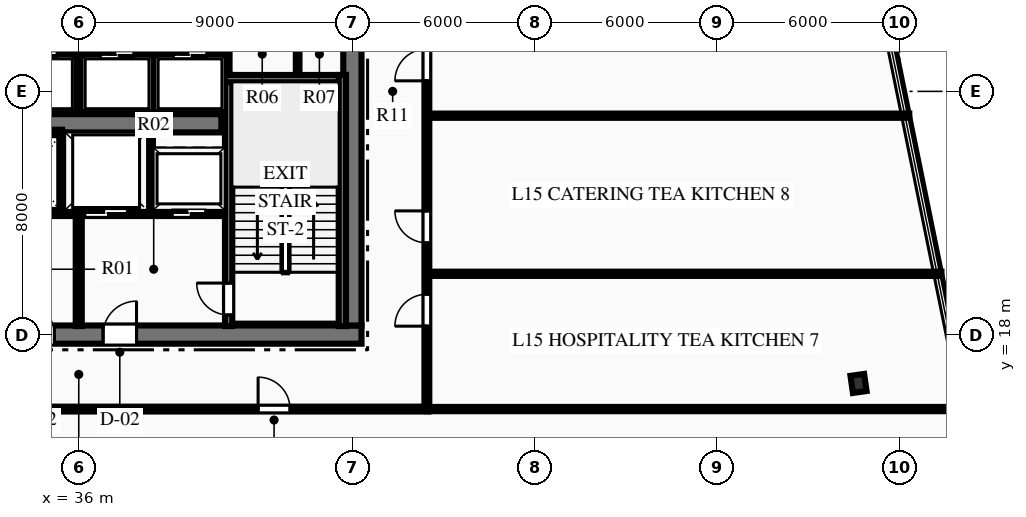
"""IFC4 building model, lengths in metres.
Left out: names, types, materials, properties, quantities, classifications, styles, units other than length and angle.
Written with IfcOpenShell. Run it as: python <this file> out.ifc"""

import sys

from ifc_helpers import new_model, si_unit, direction, frame, frame_2d, origin, origin_2d, place, context, subcontext, project, spatial, rectangle, i_section, extrude, element, fill, save


model = new_model("IFC4")
c1 = context("Model", 3, precision=1e-05, world=origin(), true_north=direction((0.0, 1.0)))
c2 = subcontext(c1, "Body", "Model", "MODEL_VIEW")
j1 = project(units=[si_unit("LENGTHUNIT", "METRE"), si_unit("PLANEANGLEUNIT", "RADIAN")], contexts=[c1])
p1 = place(None, origin())
s1 = spatial("IfcSite", under=j1, at=p1, CompositionType="ELEMENT")
p2 = place(p1, origin())
s2 = spatial("IfcBuilding", under=s1, at=p2, CompositionType="ELEMENT")
p3 = place(p2, frame((0.0, 0.0, 66.45)))
s3 = spatial("IfcBuildingStorey", under=s2, at=p3, CompositionType="ELEMENT", Elevation=66.45)
p4 = place(p3, frame((26.7, 18.0, 0.0), z_axis=(0.0, 0.0, 1.0), x_axis=(1.0, 0.0, 0.0)))
e1 = element("IfcWall", 1, at=p4, inside=s3, PredefinedType="SHEAR", context=c2, shape_type="SweptSolid", body=[
    extrude(rectangle(XDim=18.6, YDim=0.6, at=frame_2d((9.3, 0.0))), origin(), (0.0, 0.0, 1.0), 3.75),
])
p5 = place(p4, frame((7.4, 0.0, 0.0)))
e2 = element("IfcOpeningElement", 2, at=p5, cuts=e1, PredefinedType="OPENING", context=c2, shape_type="SweptSolid", body=[
    extrude(rectangle(XDim=1.1, YDim=2.15, at=frame_2d((0.55, 1.075))), frame((0.0, 0.31, 0.0), z_axis=(0.0, -1.0, 0.0), x_axis=(1.0, 0.0, 0.0)), (0.0, 0.0, 1.0), 0.62),
])
p6 = place(p4, frame((10.1, 0.0, 0.0)))
e3 = element("IfcOpeningElement", 3, at=p6, cuts=e1, PredefinedType="OPENING", context=c2, shape_type="SweptSolid", body=[
    extrude(rectangle(XDim=1.1, YDim=2.15, at=frame_2d((0.55, 1.075))), frame((0.0, 0.31, 0.0), z_axis=(0.0, -1.0, 0.0), x_axis=(1.0, 0.0, 0.0)), (0.0, 0.0, 1.0), 0.62),
])
p7 = place(p3, frame((45.0, 18.3, 0.0), z_axis=(0.0, 0.0, 1.0), x_axis=(0.0, 1.0, 0.0)))
e4 = element("IfcWall", 4, at=p7, inside=s3, PredefinedType="SHEAR", context=c2, shape_type="SweptSolid", body=[
    extrude(rectangle(XDim=15.4, YDim=0.6, at=frame_2d((7.7, 0.0))), origin(), (0.0, 0.0, 1.0), 3.75),
])
p8 = place(p7, frame((9.94, 0.0, 0.0)))
e5 = element("IfcOpeningElement", 5, at=p8, cuts=e4, PredefinedType="OPENING", context=c2, shape_type="SweptSolid", body=[
    extrude(rectangle(XDim=1.4, YDim=2.2, at=frame_2d((0.7, 1.1))), frame((0.0, 0.31, 0.0), z_axis=(0.0, -1.0, 0.0), x_axis=(1.0, 0.0, 0.0)), (0.0, 0.0, 1.0), 0.62),
])
p9 = place(p3, frame((31.31, 24.95, 0.0), z_axis=(0.0, 0.0, 1.0), x_axis=(1.0, 0.0, 0.0)))
e6 = element("IfcWall", 6, at=p9, inside=s3, PredefinedType="SHEAR", context=c2, shape_type="SweptSolid", body=[
    extrude(rectangle(XDim=9.38, YDim=0.6, at=frame_2d((4.69, 0.0))), origin(), (0.0, 0.0, 1.0), 3.75),
])
p10 = place(p3, frame((40.93, 18.28, 0.0), z_axis=(0.0, 0.0, 1.0), x_axis=(0.0, 1.0, 0.0)))
e7 = element("IfcWall", 7, at=p10, inside=s3, PredefinedType="SHEAR", context=c2, shape_type="SweptSolid", body=[
    extrude(rectangle(XDim=8.26, YDim=0.24, at=frame_2d((4.13, 0.0))), origin(), (0.0, 0.0, 1.0), 3.75),
])
p11 = place(p10, frame((0.365, 0.0, 0.0)))
e8 = element("IfcOpeningElement", 8, at=p11, cuts=e7, PredefinedType="OPENING", context=c2, shape_type="SweptSolid", body=[
    extrude(rectangle(XDim=1.05, YDim=2.15, at=frame_2d((0.525, 1.075))), frame((0.0, 0.13, 0.0), z_axis=(0.0, -1.0, 0.0), x_axis=(1.0, 0.0, 0.0)), (0.0, 0.0, 1.0), 0.26),
])
p12 = place(p3, frame((40.81, 26.42, 0.0), z_axis=(0.0, 0.0, 1.0), x_axis=(1.0, 0.0, 0.0)))
e9 = element("IfcWall", 9, at=p12, inside=s3, PredefinedType="SHEAR", context=c2, shape_type="SweptSolid", body=[
    extrude(rectangle(XDim=3.98, YDim=0.24, at=frame_2d((1.99, 0.0))), origin(), (0.0, 0.0, 1.0), 3.75),
])
p13 = place(p3, frame((44.67, 18.28, 0.0), z_axis=(0.0, 0.0, 1.0), x_axis=(0.0, 1.0, 0.0)))
e10 = element("IfcWall", 10, at=p13, inside=s3, PredefinedType="SHEAR", context=c2, shape_type="SweptSolid", body=[
    extrude(rectangle(XDim=8.26, YDim=0.24, at=frame_2d((4.13, 0.0))), origin(), (0.0, 0.0, 1.0), 3.75),
])
p14 = place(p3, frame((61.648, 16.393, 0.0), z_axis=(0.0, 0.0, 1.0), x_axis=(0.990146240249, 0.140037219771, 0.0)))
e11 = element("IfcColumn", 11, at=p14, inside=s3, PredefinedType="COLUMN", context=c2, shape_type="SweptSolid", body=[
    extrude(i_section(OverallWidth=0.454, OverallDepth=0.569, WebThickness=0.078, FlangeThickness=0.125, at=origin_2d()), origin(), (0.0, 0.0, 1.0), 3.75),
])
p15 = place(p3, frame((36.0, 18.28, 0.0), z_axis=(0.0, 0.0, 1.0), x_axis=(0.0, 1.0, 0.0)))
e12 = element("IfcWall", 12, at=p15, inside=s3, PredefinedType="PARTITIONING", context=c2, shape_type="SweptSolid", body=[
    extrude(rectangle(XDim=3.77, YDim=0.2, at=frame_2d((1.885, 0.0))), origin(), (0.0, 0.0, 1.0), 3.44),
])
p16 = place(p3, frame((31.19, 22.0, 0.0), z_axis=(0.0, 0.0, 1.0), x_axis=(1.0, 0.0, 0.0)))
e13 = element("IfcWall", 13, at=p16, inside=s3, PredefinedType="PARTITIONING", context=c2, shape_type="SweptSolid", body=[
    extrude(rectangle(XDim=4.69, YDim=0.2, at=frame_2d((2.345, 0.0))), origin(), (0.0, 0.0, 1.0), 3.44),
])
p17 = place(p16, frame((2.91, 0.0, 0.0)))
e14 = element("IfcOpeningElement", 14, at=p17, cuts=e13, PredefinedType="OPENING", context=c2, shape_type="SweptSolid", body=[
    extrude(rectangle(XDim=0.9, YDim=2.15, at=frame_2d((0.45, 1.075))), frame((0.0, 0.11, 0.0), z_axis=(0.0, -1.0, 0.0), x_axis=(1.0, 0.0, 0.0)), (0.0, 0.0, 1.0), 0.22),
])
p18 = place(p16, frame((0.635, 0.0, 0.0)))
e15 = element("IfcOpeningElement", 15, at=p18, cuts=e13, PredefinedType="OPENING", context=c2, shape_type="SweptSolid", body=[
    extrude(rectangle(XDim=1.1, YDim=2.15, at=frame_2d((0.55, 1.075))), frame((0.0, 0.11, 0.0), z_axis=(0.0, -1.0, 0.0), x_axis=(1.0, 0.0, 0.0)), (0.0, 0.0, 1.0), 0.22),
])
p19 = place(p3, frame((36.12, 22.0, 0.0), z_axis=(0.0, 0.0, 1.0), x_axis=(1.0, 0.0, 0.0)))
e16 = element("IfcWall", 16, at=p19, inside=s3, PredefinedType="PARTITIONING", context=c2, shape_type="SweptSolid", body=[
    extrude(rectangle(XDim=4.69, YDim=0.2, at=frame_2d((2.345, 0.0))), origin(), (0.0, 0.0, 1.0), 3.44),
])
p20 = place(p19, frame((2.955, 0.0, 0.0)))
e17 = element("IfcOpeningElement", 17, at=p20, cuts=e16, PredefinedType="OPENING", context=c2, shape_type="SweptSolid", body=[
    extrude(rectangle(XDim=1.1, YDim=2.15, at=frame_2d((0.55, 1.075))), frame((0.0, 0.11, 0.0), z_axis=(0.0, -1.0, 0.0), x_axis=(1.0, 0.0, 0.0)), (0.0, 0.0, 1.0), 0.22),
])
p21 = place(p19, frame((0.08, 0.0, 0.0)))
e18 = element("IfcOpeningElement", 18, at=p21, cuts=e16, PredefinedType="OPENING", context=c2, shape_type="SweptSolid", body=[
    extrude(rectangle(XDim=1.4, YDim=2.2, at=frame_2d((0.7, 1.1))), frame((0.0, 0.11, 0.0), z_axis=(0.0, -1.0, 0.0), x_axis=(1.0, 0.0, 0.0)), (0.0, 0.0, 1.0), 0.22),
])
p22 = place(p3, frame((35.45, 22.05, 0.0), z_axis=(0.0, 0.0, 1.0), x_axis=(0.0, 1.0, 0.0)))
e19 = element("IfcWall", 19, at=p22, inside=s3, PredefinedType="PARTITIONING", context=c2, shape_type="SweptSolid", body=[
    extrude(rectangle(XDim=2.6, YDim=0.18, at=frame_2d((1.3, 0.0))), origin(), (0.0, 0.0, 1.0), 3.44),
])
p23 = place(p3, frame((33.65, 24.65, 0.0), z_axis=(0.0, 0.0, 1.0), x_axis=(1.0, 0.0, 0.0)))
e20 = element("IfcWall", 20, at=p23, inside=s3, PredefinedType="PARTITIONING", context=c2, shape_type="SweptSolid", body=[
    extrude(rectangle(XDim=1.8, YDim=0.18, at=frame_2d((0.9, 0.0))), origin(), (0.0, 0.0, 1.0), 3.44),
])
p24 = place(p3, frame((38.35, 22.05, 0.0), z_axis=(0.0, 0.0, 1.0), x_axis=(0.0, 1.0, 0.0)))
e21 = element("IfcWall", 21, at=p24, inside=s3, PredefinedType="PARTITIONING", context=c2, shape_type="SweptSolid", body=[
    extrude(rectangle(XDim=2.6, YDim=0.18, at=frame_2d((1.3, 0.0))), origin(), (0.0, 0.0, 1.0), 3.44),
])
p25 = place(p3, frame((40.88, 26.54, 0.0), z_axis=(0.0, 0.0, 1.0), x_axis=(0.0, 1.0, 0.0)))
e22 = element("IfcWall", 22, at=p25, inside=s3, PredefinedType="PARTITIONING", context=c2, shape_type="SweptSolid", body=[
    extrude(rectangle(XDim=1.51, YDim=0.16, at=frame_2d((0.755, 0.0))), origin(), (0.0, 0.0, 1.0), 3.44),
])
p26 = place(p3, frame((43.2, 26.54, 0.0), z_axis=(0.0, 0.0, 1.0), x_axis=(0.0, 1.0, 0.0)))
e23 = element("IfcWall", 23, at=p26, inside=s3, PredefinedType="PARTITIONING", context=c2, shape_type="SweptSolid", body=[
    extrude(rectangle(XDim=1.44, YDim=0.12, at=frame_2d((0.72, 0.0))), origin(), (0.0, 0.0, 1.0), 3.44),
])
p27 = place(p3, frame((31.2, 27.2, 0.0), z_axis=(0.0, 0.0, 1.0), x_axis=(1.0, 0.0, 0.0)))
e24 = element("IfcWall", 24, at=p27, inside=s3, PredefinedType="PARTITIONING", context=c2, shape_type="SweptSolid", body=[
    extrude(rectangle(XDim=9.6, YDim=0.18, at=frame_2d((4.8, 0.0))), origin(), (0.0, 0.0, 1.0), 3.44),
])
p28 = place(p27, frame((0.59, 0.0, 0.0)))
e25 = element("IfcOpeningElement", 25, at=p28, cuts=e24, PredefinedType="OPENING", context=c2, shape_type="SweptSolid", body=[
    extrude(rectangle(XDim=1.1, YDim=2.15, at=frame_2d((0.55, 1.075))), frame((0.0, 0.1, 0.0), z_axis=(0.0, -1.0, 0.0), x_axis=(1.0, 0.0, 0.0)), (0.0, 0.0, 1.0), 0.2),
])
p29 = place(p27, frame((2.99, 0.0, 0.0)))
e26 = element("IfcOpeningElement", 26, at=p29, cuts=e24, PredefinedType="OPENING", context=c2, shape_type="SweptSolid", body=[
    extrude(rectangle(XDim=1.1, YDim=2.15, at=frame_2d((0.55, 1.075))), frame((0.0, 0.1, 0.0), z_axis=(0.0, -1.0, 0.0), x_axis=(1.0, 0.0, 0.0)), (0.0, 0.0, 1.0), 0.2),
])
p30 = place(p27, frame((5.51, 0.0, 0.0)))
e27 = element("IfcOpeningElement", 27, at=p30, cuts=e24, PredefinedType="OPENING", context=c2, shape_type="SweptSolid", body=[
    extrude(rectangle(XDim=1.1, YDim=2.15, at=frame_2d((0.55, 1.075))), frame((0.0, 0.1, 0.0), z_axis=(0.0, -1.0, 0.0), x_axis=(1.0, 0.0, 0.0)), (0.0, 0.0, 1.0), 0.2),
])
p31 = place(p27, frame((7.91, 0.0, 0.0)))
e28 = element("IfcOpeningElement", 28, at=p31, cuts=e24, PredefinedType="OPENING", context=c2, shape_type="SweptSolid", body=[
    extrude(rectangle(XDim=1.1, YDim=2.15, at=frame_2d((0.55, 1.075))), frame((0.0, 0.1, 0.0), z_axis=(0.0, -1.0, 0.0), x_axis=(1.0, 0.0, 0.0)), (0.0, 0.0, 1.0), 0.2),
])
for number, where, z_axis, x_axis in (
    (29, (36.0, 25.3, 0.0), (0.0, 0.0, 1.0), (0.0, 1.0, 0.0)),
    (30, (38.46, 25.3, 0.0), (0.0, 0.0, 1.0), (0.0, 1.0, 0.0)),
):
    element("IfcWall", number, at=place(p3, frame(where, z_axis=z_axis, x_axis=x_axis)), inside=s3, PredefinedType="PARTITIONING", context=c2, shape_type="SweptSolid", body=[
        extrude(rectangle(XDim=1.9, YDim=0.18, at=frame_2d((0.95, 0.0))), origin(), (0.0, 0.0, 1.0), 3.44),
    ])
p32 = place(p3, frame((24.5, 15.55, 0.0), z_axis=(0.0, 0.0, 1.0), x_axis=(1.0, 0.0, 0.0)))
e31 = element("IfcWall", 31, at=p32, inside=s3, PredefinedType="PARTITIONING", context=c2, shape_type="SweptSolid", body=[
    extrude(rectangle(XDim=23.0, YDim=0.16, at=frame_2d((11.5, 0.0))), origin(), (0.0, 0.0, 1.0), 3.44),
])
p33 = place(p32, frame((1.25, 0.0, 0.0)))
e32 = element("IfcOpeningElement", 32, at=p33, cuts=e31, PredefinedType="OPENING", context=c2, shape_type="SweptSolid", body=[
    extrude(rectangle(XDim=0.9, YDim=2.15, at=frame_2d((0.45, 1.075))), frame((0.0, 0.09, 0.0), z_axis=(0.0, -1.0, 0.0), x_axis=(1.0, 0.0, 0.0)), (0.0, 0.0, 1.0), 0.18),
])
p34 = place(p32, frame((3.55, 0.0, 0.0)))
e33 = element("IfcOpeningElement", 33, at=p34, cuts=e31, PredefinedType="OPENING", context=c2, shape_type="SweptSolid", body=[
    extrude(rectangle(XDim=0.9, YDim=2.15, at=frame_2d((0.45, 1.075))), frame((0.0, 0.09, 0.0), z_axis=(0.0, -1.0, 0.0), x_axis=(1.0, 0.0, 0.0)), (0.0, 0.0, 1.0), 0.18),
])
p35 = place(p32, frame((5.8, 0.0, 0.0)))
e34 = element("IfcOpeningElement", 34, at=p35, cuts=e31, PredefinedType="OPENING", context=c2, shape_type="SweptSolid", body=[
    extrude(rectangle(XDim=1.0, YDim=2.15, at=frame_2d((0.5, 1.075))), frame((0.0, 0.09, 0.0), z_axis=(0.0, -1.0, 0.0), x_axis=(1.0, 0.0, 0.0)), (0.0, 0.0, 1.0), 0.18),
])
p36 = place(p32, frame((17.399, 0.0, 0.0)))
e35 = element("IfcOpeningElement", 35, at=p36, cuts=e31, PredefinedType="OPENING", context=c2, shape_type="SweptSolid", body=[
    extrude(rectangle(XDim=1.05, YDim=2.15, at=frame_2d((0.525, 1.075))), frame((0.0, 0.09, 0.0), z_axis=(0.0, -1.0, 0.0), x_axis=(1.0, 0.0, 0.0)), (0.0, 0.0, 1.0), 0.18),
])
p37 = place(p3, frame((47.45, 15.55, 0.0), z_axis=(0.0, 0.0, 1.0), x_axis=(0.0, 1.0, 0.0)))
e36 = element("IfcWall", 36, at=p37, inside=s3, PredefinedType="PARTITIONING", context=c2, shape_type="SweptSolid", body=[
    extrude(rectangle(XDim=20.9, YDim=0.16, at=frame_2d((10.45, 0.0))), origin(), (0.0, 0.0, 1.0), 3.44),
])
p38 = place(p37, frame((2.727, 0.0, 0.0)))
e37 = element("IfcOpeningElement", 37, at=p38, cuts=e36, PredefinedType="OPENING", context=c2, shape_type="SweptSolid", body=[
    extrude(rectangle(XDim=1.05, YDim=2.15, at=frame_2d((0.525, 1.075))), frame((0.0, 0.09, 0.0), z_axis=(0.0, -1.0, 0.0), x_axis=(1.0, 0.0, 0.0)), (0.0, 0.0, 1.0), 0.18),
])
p39 = place(p37, frame((5.469, 0.0, 0.0)))
e38 = element("IfcOpeningElement", 38, at=p39, cuts=e36, PredefinedType="OPENING", context=c2, shape_type="SweptSolid", body=[
    extrude(rectangle(XDim=1.05, YDim=2.15, at=frame_2d((0.525, 1.075))), frame((0.0, 0.09, 0.0), z_axis=(0.0, -1.0, 0.0), x_axis=(1.0, 0.0, 0.0)), (0.0, 0.0, 1.0), 0.18),
])
p40 = place(p37, frame((10.797, 0.0, 0.0)))
e39 = element("IfcOpeningElement", 39, at=p40, cuts=e36, PredefinedType="OPENING", context=c2, shape_type="SweptSolid", body=[
    extrude(rectangle(XDim=1.05, YDim=2.15, at=frame_2d((0.525, 1.075))), frame((0.0, 0.09, 0.0), z_axis=(0.0, -1.0, 0.0), x_axis=(1.0, 0.0, 0.0)), (0.0, 0.0, 1.0), 0.18),
])
p41 = place(p37, frame((18.461, 0.0, 0.0)))
e40 = element("IfcOpeningElement", 40, at=p41, cuts=e36, PredefinedType="OPENING", context=c2, shape_type="SweptSolid", body=[
    extrude(rectangle(XDim=1.05, YDim=2.15, at=frame_2d((0.525, 1.075))), frame((0.0, 0.09, 0.0), z_axis=(0.0, -1.0, 0.0), x_axis=(1.0, 0.0, 0.0)), (0.0, 0.0, 1.0), 0.18),
])
p42 = place(p3, frame((47.45, 15.55, 0.0), z_axis=(0.0, 0.0, 1.0), x_axis=(1.0, 0.0, 0.0)))
e41 = element("IfcWall", 41, at=p42, inside=s3, PredefinedType="PARTITIONING", context=c2, shape_type="SweptSolid", body=[
    extrude(rectangle(XDim=17.831, YDim=0.14, at=frame_2d((8.916, 0.0))), origin(), (0.0, 0.0, 1.0), 3.44),
])
p43 = place(p3, frame((47.45, 20.0, 0.0), z_axis=(0.0, 0.0, 1.0), x_axis=(1.0, 0.0, 0.0)))
e42 = element("IfcWall", 42, at=p43, inside=s3, PredefinedType="PARTITIONING", context=c2, shape_type="SweptSolid", body=[
    extrude(rectangle(XDim=16.926, YDim=0.14, at=frame_2d((8.463, 0.0))), origin(), (0.0, 0.0, 1.0), 3.44),
])
p44 = place(p3, frame((47.45, 25.2, 0.0), z_axis=(0.0, 0.0, 1.0), x_axis=(1.0, 0.0, 0.0)))
e43 = element("IfcWall", 43, at=p44, inside=s3, PredefinedType="PARTITIONING", context=c2, shape_type="SweptSolid", body=[
    extrude(rectangle(XDim=15.868, YDim=0.14, at=frame_2d((7.934, 0.0))), origin(), (0.0, 0.0, 1.0), 3.44),
])
p45 = place(p11, origin())
e44 = element("IfcDoor", 44, at=p45, inside=s3, OperationType="SINGLE_SWING_RIGHT", PredefinedType="DOOR", context=c2, shape_type="SweptSolid", body=[
    extrude(rectangle(XDim=1.05, YDim=2.15, at=frame_2d((0.525, 1.075))), frame((0.0, 0.025, 0.0), z_axis=(0.0, -1.0, 0.0), x_axis=(1.0, 0.0, 0.0)), (0.0, 0.0, 1.0), 0.05),
])
fill(e8, e44)
p46 = place(p5, origin())
e45 = element("IfcDoor", 45, at=p46, inside=s3, OperationType="SINGLE_SWING_LEFT", PredefinedType="DOOR", context=c2, shape_type="SweptSolid", body=[
    extrude(rectangle(XDim=1.1, YDim=2.15, at=frame_2d((0.55, 1.075))), frame((0.0, 0.025, 0.0), z_axis=(0.0, -1.0, 0.0), x_axis=(1.0, 0.0, 0.0)), (0.0, 0.0, 1.0), 0.05),
])
fill(e2, e45)
p47 = place(p6, origin())
e46 = element("IfcDoor", 46, at=p47, inside=s3, OperationType="SINGLE_SWING_RIGHT", PredefinedType="DOOR", context=c2, shape_type="SweptSolid", body=[
    extrude(rectangle(XDim=1.1, YDim=2.15, at=frame_2d((0.55, 1.075))), frame((0.0, 0.025, 0.0), z_axis=(0.0, -1.0, 0.0), x_axis=(1.0, 0.0, 0.0)), (0.0, 0.0, 1.0), 0.05),
])
fill(e3, e46)
p48 = place(p36, origin())
e47 = element("IfcDoor", 47, at=p48, inside=s3, OperationType="SINGLE_SWING_LEFT", PredefinedType="DOOR", context=c2, shape_type="SweptSolid", body=[
    extrude(rectangle(XDim=1.05, YDim=2.15, at=frame_2d((0.525, 1.075))), frame((0.0, 0.025, 0.0), z_axis=(0.0, -1.0, 0.0), x_axis=(1.0, 0.0, 0.0)), (0.0, 0.0, 1.0), 0.05),
])
fill(e35, e47)
p49 = place(p38, origin())
e48 = element("IfcDoor", 48, at=p49, inside=s3, OperationType="SINGLE_SWING_LEFT", PredefinedType="DOOR", context=c2, shape_type="SweptSolid", body=[
    extrude(rectangle(XDim=1.05, YDim=2.15, at=frame_2d((0.525, 1.075))), frame((0.0, 0.025, 0.0), z_axis=(0.0, -1.0, 0.0), x_axis=(1.0, 0.0, 0.0)), (0.0, 0.0, 1.0), 0.05),
])
fill(e37, e48)
p50 = place(p39, origin())
e49 = element("IfcDoor", 49, at=p50, inside=s3, OperationType="SINGLE_SWING_RIGHT", PredefinedType="DOOR", context=c2, shape_type="SweptSolid", body=[
    extrude(rectangle(XDim=1.05, YDim=2.15, at=frame_2d((0.525, 1.075))), frame((0.0, 0.025, 0.0), z_axis=(0.0, -1.0, 0.0), x_axis=(1.0, 0.0, 0.0)), (0.0, 0.0, 1.0), 0.05),
])
fill(e38, e49)
p51 = place(p40, origin())
e50 = element("IfcDoor", 50, at=p51, inside=s3, OperationType="SINGLE_SWING_LEFT", PredefinedType="DOOR", context=c2, shape_type="SweptSolid", body=[
    extrude(rectangle(XDim=1.05, YDim=2.15, at=frame_2d((0.525, 1.075))), frame((0.0, 0.025, 0.0), z_axis=(0.0, -1.0, 0.0), x_axis=(1.0, 0.0, 0.0)), (0.0, 0.0, 1.0), 0.05),
])
fill(e39, e50)
p52 = place(p29, origin())
e51 = element("IfcDoor", 51, at=p52, inside=s3, OperationType="SLIDING_TO_LEFT", PredefinedType="DOOR", context=c2, shape_type="SweptSolid", body=[
    extrude(rectangle(XDim=1.1, YDim=2.15, at=frame_2d((0.55, 1.075))), frame((0.0, 0.025, 0.0), z_axis=(0.0, -1.0, 0.0), x_axis=(1.0, 0.0, 0.0)), (0.0, 0.0, 1.0), 0.05),
])
fill(e26, e51)
p53 = place(p30, origin())
e52 = element("IfcDoor", 52, at=p53, inside=s3, OperationType="SLIDING_TO_LEFT", PredefinedType="DOOR", context=c2, shape_type="SweptSolid", body=[
    extrude(rectangle(XDim=1.1, YDim=2.15, at=frame_2d((0.55, 1.075))), frame((0.0, 0.025, 0.0), z_axis=(0.0, -1.0, 0.0), x_axis=(1.0, 0.0, 0.0)), (0.0, 0.0, 1.0), 0.05),
])
fill(e27, e52)
p54 = place(p31, origin())
e53 = element("IfcDoor", 53, at=p54, inside=s3, OperationType="SLIDING_TO_LEFT", PredefinedType="DOOR", context=c2, shape_type="SweptSolid", body=[
    extrude(rectangle(XDim=1.1, YDim=2.15, at=frame_2d((0.55, 1.075))), frame((0.0, 0.025, 0.0), z_axis=(0.0, -1.0, 0.0), x_axis=(1.0, 0.0, 0.0)), (0.0, 0.0, 1.0), 0.05),
])
fill(e28, e53)
p55 = place(p20, origin())
e54 = element("IfcDoor", 54, at=p55, inside=s3, OperationType="SLIDING_TO_LEFT", PredefinedType="DOOR", context=c2, shape_type="SweptSolid", body=[
    extrude(rectangle(XDim=1.1, YDim=2.15, at=frame_2d((0.55, 1.075))), frame((0.0, 0.025, 0.0), z_axis=(0.0, -1.0, 0.0), x_axis=(1.0, 0.0, 0.0)), (0.0, 0.0, 1.0), 0.05),
])
fill(e17, e54)
p56 = place(p21, origin())
e55 = element("IfcDoor", 55, at=p56, inside=s3, OperationType="SLIDING_TO_LEFT", PredefinedType="DOOR", context=c2, shape_type="SweptSolid", body=[
    extrude(rectangle(XDim=1.4, YDim=2.2, at=frame_2d((0.7, 1.1))), frame((0.0, 0.025, 0.0), z_axis=(0.0, -1.0, 0.0), x_axis=(1.0, 0.0, 0.0)), (0.0, 0.0, 1.0), 0.05),
])
fill(e18, e55)
save(model, sys.argv[1])
